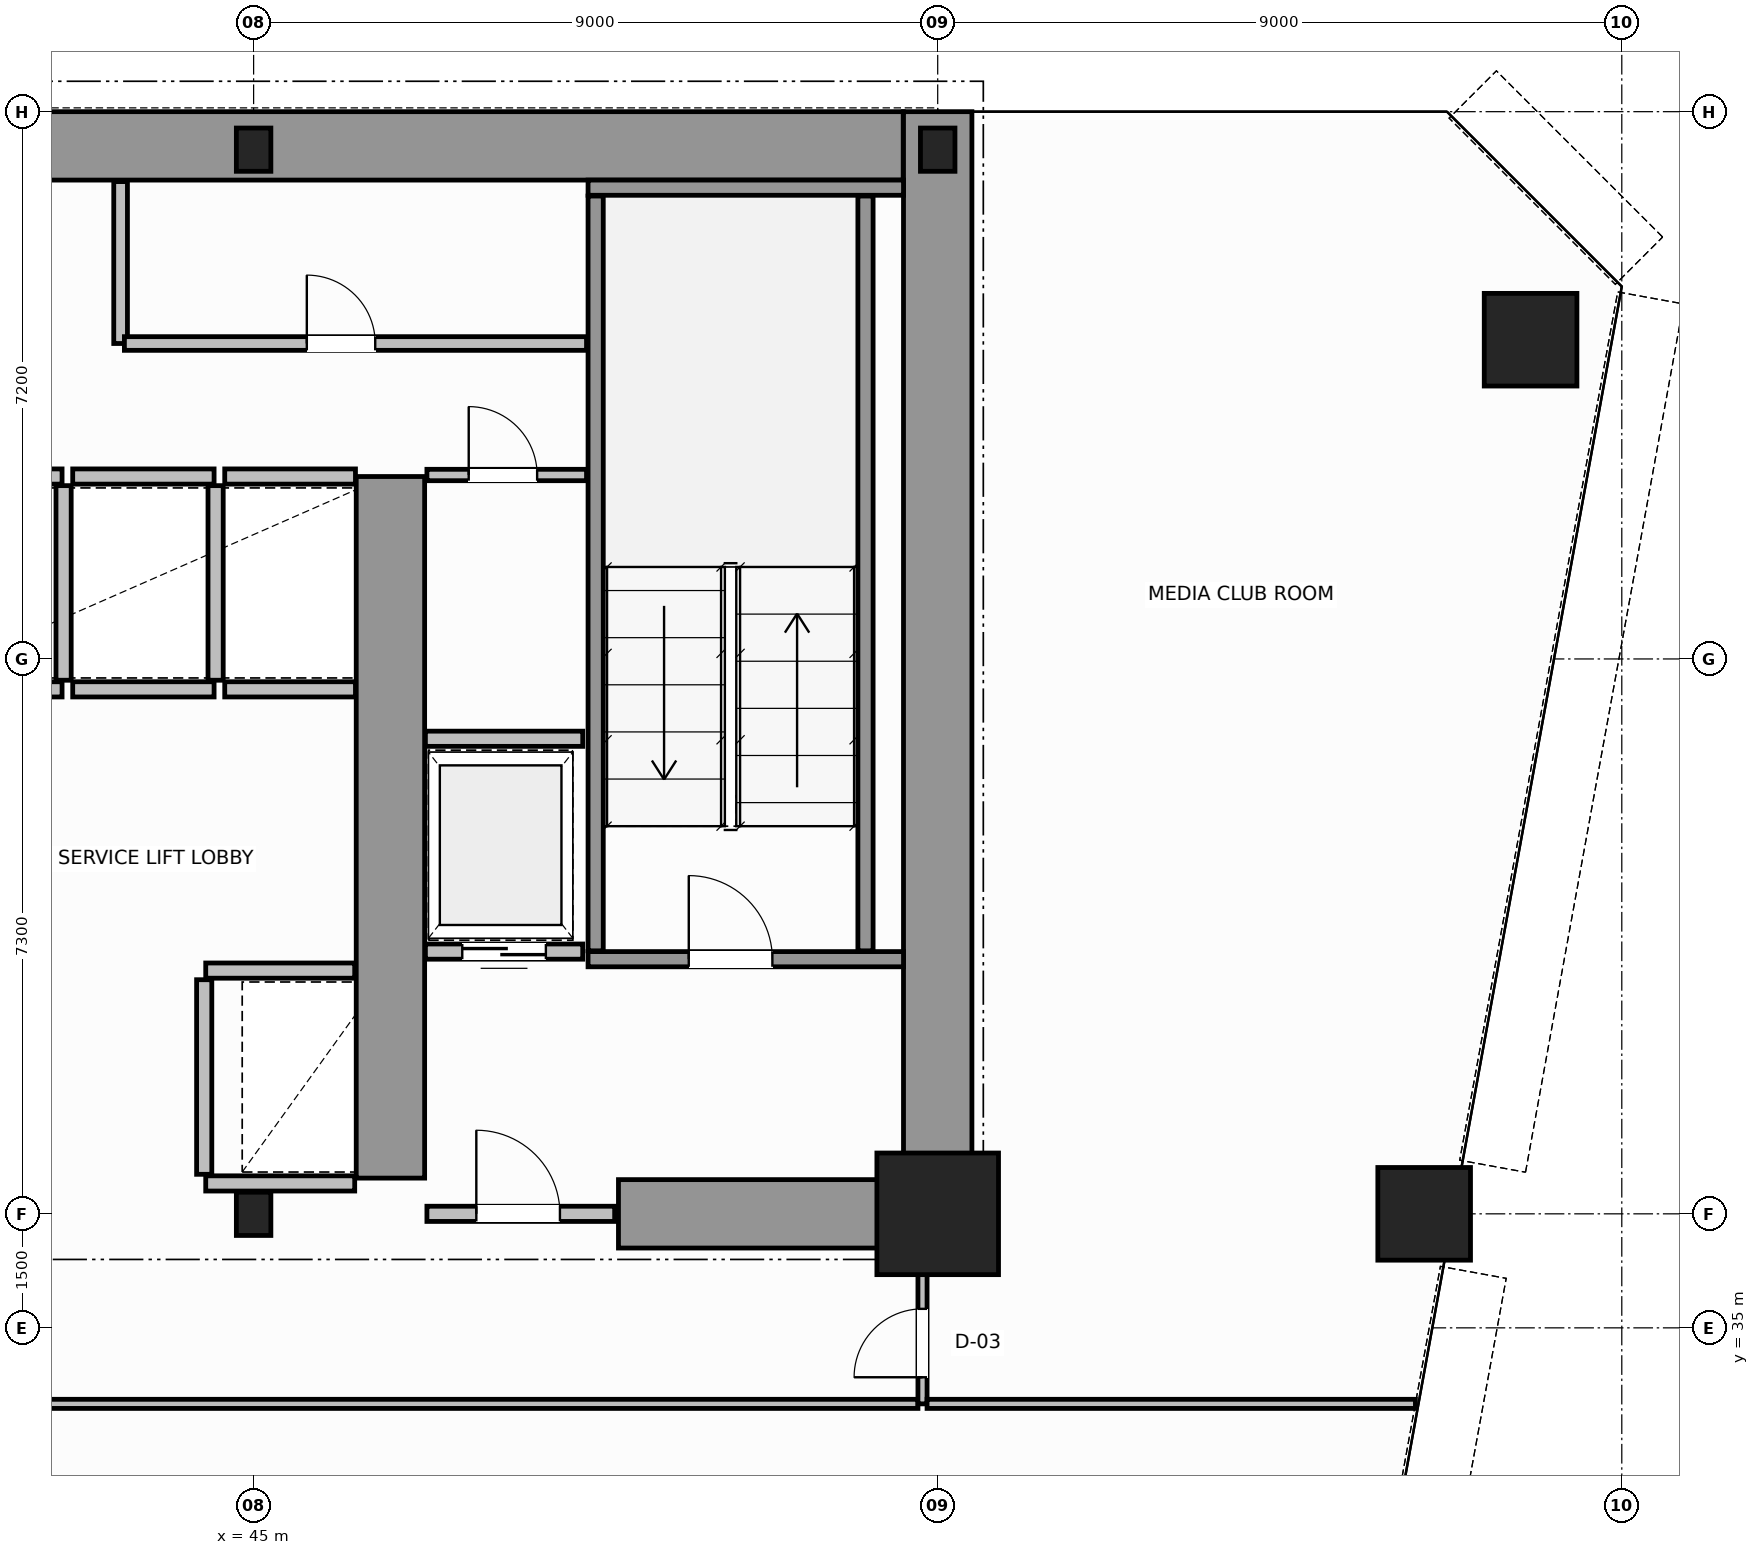
"""IFC4 building model, lengths in metres.
Left out: names, types, materials, properties, quantities, classifications, styles, units other than length and angle.
Written with IfcOpenShell. Run it as: python <this file> out.ifc"""

import sys

from ifc_helpers import new_model, si_unit, direction, frame, frame_2d, origin, origin_2d, place, context, subcontext, project, spatial, rectangle, hollow_circle, i_section, extrude, source, transform, mapped, element, fill, save


model = new_model("IFC4")
c1 = context("Model", 3, precision=1e-05, world=origin(), true_north=direction((0.0, 1.0)))
c2 = subcontext(c1, "Body", "Model", "MODEL_VIEW")
j1 = project(units=[si_unit("LENGTHUNIT", "METRE"), si_unit("PLANEANGLEUNIT", "RADIAN")], contexts=[c1])
p1 = place(None, origin())
s1 = spatial("IfcSite", under=j1, at=p1, CompositionType="ELEMENT")
p2 = place(p1, origin())
s2 = spatial("IfcBuilding", under=s1, at=p2, CompositionType="ELEMENT")
p3 = place(p2, frame((0.0, 0.0, 45.4)))
s3 = spatial("IfcBuildingStorey", under=s2, at=p3, CompositionType="ELEMENT", Elevation=45.4)
m1 = source(origin(), c2, "Body", "SweptSolid", [
    extrude(i_section(OverallWidth=0.454, OverallDepth=0.569, WebThickness=0.078, FlangeThickness=0.08, FilletRadius=0.015, at=origin_2d()), origin(), (0.0, 0.0, 1.0), 3.8),
])
p4 = place(p3, frame((45.0, 36.5, 0.0), z_axis=(0.0, 0.0, 1.0), x_axis=(1.0, 0.0, 0.0)))
e1 = element("IfcColumn", 1, at=p4, inside=s3, PredefinedType="COLUMN", context=c2, shape_type="MappedRepresentation", body=[
    mapped(m1, transform((0.0, 0.0, 0.0), scale=1.0)),
])
m2 = source(origin(), c2, "Body", "SweptSolid", [
    extrude(rectangle(XDim=1.6, YDim=1.6, at=origin_2d()), origin(), (0.0, 0.0, 1.0), 3.8),
])
p5 = place(p3, frame((54.0, 36.5, 0.0), z_axis=(0.0, 0.0, 1.0), x_axis=(1.0, 0.0, 0.0)))
e2 = element("IfcColumn", 2, at=p5, inside=s3, PredefinedType="COLUMN", context=c2, shape_type="MappedRepresentation", body=[
    mapped(m2, transform((0.0, 0.0, 0.0), scale=1.0)),
])
for number, where, z_axis, x_axis in (
    (3, (45.0, 50.5, 0.0), (0.0, 0.0, 1.0), (1.0, 0.0, 0.0)),
    (4, (54.0, 50.5, 0.0), (0.0, 0.0, 1.0), (1.0, 0.0, 0.0)),
):
    element("IfcColumn", number, at=place(p3, frame(where, z_axis=z_axis, x_axis=x_axis)), inside=s3, PredefinedType="COLUMN", context=c2, shape_type="MappedRepresentation", body=[
        mapped(m1, transform((0.0, 0.0, 0.0), scale=1.0)),
    ])
m3 = source(origin(), c2, "Body", "SweptSolid", [
    extrude(hollow_circle(Radius=0.61, WallThickness=0.05, at=origin_2d()), origin(), (0.0, 0.0, 1.0), 3.8),
])
for number, where, z_axis, x_axis in (
    (5, (61.8, 48.0, 0.0), (0.0, 0.0, 1.0), (1.0, 0.0, 0.0)),
    (6, (60.4, 36.5, 0.0), (0.0, 0.0, 1.0), (1.0, 0.0, 0.0)),
):
    element("IfcColumn", number, at=place(p3, frame(where, z_axis=z_axis, x_axis=x_axis)), inside=s3, PredefinedType="COLUMN", context=c2, shape_type="MappedRepresentation", body=[
        mapped(m3, transform((0.0, 0.0, 0.0), scale=1.0)),
    ])
p6 = place(p3, frame((34.002, 50.55, 0.0), z_axis=(0.0, 0.0, 1.0), x_axis=(1.0, 0.0, 0.0)))
e7 = element("IfcWall", 7, at=p6, inside=s3, PredefinedType="SHEAR", context=c2, shape_type="SweptSolid", body=[
    extrude(rectangle(XDim=19.544, YDim=0.9, at=frame_2d((9.772, 0.0))), origin(), (0.0, 0.0, 1.0), 3.8),
])
p7 = place(p3, frame((54.0, 36.5, 0.0), z_axis=(0.0, 0.0, 1.0), x_axis=(0.0, 1.0, 0.0)))
e8 = element("IfcWall", 8, at=p7, inside=s3, PredefinedType="SHEAR", context=c2, shape_type="SweptSolid", body=[
    extrude(rectangle(XDim=14.5, YDim=0.9, at=frame_2d((7.25, 0.0))), origin(), (0.0, 0.0, 1.0), 3.8),
])
p8 = place(p3, frame((49.8, 36.5, 0.0), z_axis=(0.0, 0.0, 1.0), x_axis=(1.0, 0.0, 0.0)))
e9 = element("IfcWall", 9, at=p8, inside=s3, PredefinedType="SHEAR", context=c2, shape_type="SweptSolid", body=[
    extrude(rectangle(XDim=3.73, YDim=0.9, at=frame_2d((1.865, 0.0))), origin(), (0.0, 0.0, 1.0), 2.38),
])
p9 = place(p3, frame((46.8, 36.97, 0.0), z_axis=(0.0, 0.0, 1.0), x_axis=(0.0, 1.0, 0.0)))
e10 = element("IfcWall", 10, at=p9, inside=s3, PredefinedType="SHEAR", context=c2, shape_type="SweptSolid", body=[
    extrude(rectangle(XDim=9.23, YDim=0.9, at=frame_2d((4.615, 0.0))), origin(), (0.0, 0.0, 1.0), 3.8),
])
p10 = place(p3, frame((49.4, 39.85, 0.0), z_axis=(0.0, 0.0, 1.0), x_axis=(1.0, 0.0, 0.0)))
e11 = element("IfcWall", 11, at=p10, inside=s3, PredefinedType="SOLIDWALL", context=c2, shape_type="SweptSolid", body=[
    extrude(rectangle(XDim=4.15, YDim=0.2, at=frame_2d((2.075, 0.0))), origin(), (0.0, 0.0, 1.0), 3.8),
])
p11 = place(p10, frame((1.325, 0.0, 0.0)))
e12 = element("IfcOpeningElement", 12, at=p11, cuts=e11, PredefinedType="OPENING", context=c2, shape_type="SweptSolid", body=[
    extrude(rectangle(XDim=1.1, YDim=2.15, at=frame_2d((0.55, 1.075))), frame((0.0, 0.11, 0.0), z_axis=(0.0, -1.0, 0.0), x_axis=(1.0, 0.0, 0.0)), (0.0, 0.0, 1.0), 0.22),
])
p12 = place(p3, frame((49.4, 50.0, 0.0), z_axis=(0.0, 0.0, 1.0), x_axis=(1.0, 0.0, 0.0)))
e13 = element("IfcWall", 13, at=p12, inside=s3, PredefinedType="SOLIDWALL", context=c2, shape_type="SweptSolid", body=[
    extrude(rectangle(XDim=4.15, YDim=0.2, at=frame_2d((2.075, 0.0))), origin(), (0.0, 0.0, 1.0), 3.8),
])
for number, where, z_axis, x_axis in (
    (14, (49.5, 39.96, 0.0), (0.0, 0.0, 1.0), (0.0, 1.0, 0.0)),
    (15, (53.05, 39.96, 0.0), (0.0, 0.0, 1.0), (0.0, 1.0, 0.0)),
):
    element("IfcWall", number, at=place(p3, frame(where, z_axis=z_axis, x_axis=x_axis)), inside=s3, PredefinedType="SOLIDWALL", context=c2, shape_type="SweptSolid", body=[
        extrude(rectangle(XDim=9.93, YDim=0.2, at=frame_2d((4.965, 0.0))), origin(), (0.0, 0.0, 1.0), 3.8),
    ])
p13 = place(p3, frame((47.28, 36.5, 0.0), z_axis=(0.0, 0.0, 1.0), x_axis=(1.0, 0.0, 0.0)))
e16 = element("IfcWall", 16, at=p13, inside=s3, PredefinedType="SOLIDWALL", context=c2, shape_type="SweptSolid", body=[
    extrude(rectangle(XDim=2.47, YDim=0.2, at=frame_2d((1.235, 0.0))), origin(), (0.0, 0.0, 1.0), 2.37),
])
p14 = place(p13, frame((0.65, 0.0, 0.0)))
e17 = element("IfcOpeningElement", 17, at=p14, cuts=e16, PredefinedType="OPENING", context=c2, shape_type="SweptSolid", body=[
    extrude(rectangle(XDim=1.1, YDim=2.15, at=frame_2d((0.55, 1.075))), frame((0.0, 0.11, 0.0), z_axis=(0.0, -1.0, 0.0), x_axis=(1.0, 0.0, 0.0)), (0.0, 0.0, 1.0), 0.22),
])
p15 = place(p3, frame((44.37, 39.7, 0.0), z_axis=(0.0, 0.0, 1.0), x_axis=(1.0, 0.0, 0.0)))
e18 = element("IfcWall", 18, at=p15, inside=s3, PredefinedType="SOLIDWALL", context=c2, shape_type="SweptSolid", body=[
    extrude(rectangle(XDim=1.96, YDim=0.2, at=frame_2d((0.98, 0.0))), origin(), (0.0, 0.0, 1.0), 3.58),
])
p16 = place(p3, frame((44.37, 36.9, 0.0), z_axis=(0.0, 0.0, 1.0), x_axis=(1.0, 0.0, 0.0)))
e19 = element("IfcWall", 19, at=p16, inside=s3, PredefinedType="SOLIDWALL", context=c2, shape_type="SweptSolid", body=[
    extrude(rectangle(XDim=1.96, YDim=0.2, at=frame_2d((0.98, 0.0))), origin(), (0.0, 0.0, 1.0), 2.37),
])
p17 = place(p3, frame((44.35, 37.02, 0.0), z_axis=(0.0, 0.0, 1.0), x_axis=(0.0, 1.0, 0.0)))
e20 = element("IfcWall", 20, at=p17, inside=s3, PredefinedType="SOLIDWALL", context=c2, shape_type="SweptSolid", body=[
    extrude(rectangle(XDim=2.56, YDim=0.2, at=frame_2d((1.28, 0.0))), origin(), (0.0, 0.0, 1.0), 3.58),
])
for number, where, z_axis, x_axis in (
    (21, (40.62, 43.4, 0.0), (0.0, 0.0, 1.0), (1.0, 0.0, 0.0)),
    (22, (40.62, 46.2, 0.0), (0.0, 0.0, 1.0), (1.0, 0.0, 0.0)),
):
    element("IfcWall", number, at=place(p3, frame(where, z_axis=z_axis, x_axis=x_axis)), inside=s3, PredefinedType="SOLIDWALL", context=c2, shape_type="SweptSolid", body=[
        extrude(rectangle(XDim=1.86, YDim=0.2, at=frame_2d((0.93, 0.0))), origin(), (0.0, 0.0, 1.0), 3.58),
    ])
p18 = place(p3, frame((42.5, 43.52, 0.0), z_axis=(0.0, 0.0, 1.0), x_axis=(0.0, 1.0, 0.0)))
e23 = element("IfcWall", 23, at=p18, inside=s3, PredefinedType="SOLIDWALL", context=c2, shape_type="SweptSolid", body=[
    extrude(rectangle(XDim=2.56, YDim=0.2, at=frame_2d((1.28, 0.0))), origin(), (0.0, 0.0, 1.0), 3.58),
])
for number, where, z_axis, x_axis in (
    (24, (42.62, 43.4, 0.0), (0.0, 0.0, 1.0), (1.0, 0.0, 0.0)),
    (25, (42.62, 46.2, 0.0), (0.0, 0.0, 1.0), (1.0, 0.0, 0.0)),
):
    element("IfcWall", number, at=place(p3, frame(where, z_axis=z_axis, x_axis=x_axis)), inside=s3, PredefinedType="SOLIDWALL", context=c2, shape_type="SweptSolid", body=[
        extrude(rectangle(XDim=1.86, YDim=0.2, at=frame_2d((0.93, 0.0))), origin(), (0.0, 0.0, 1.0), 3.58),
    ])
p19 = place(p3, frame((44.5, 43.52, 0.0), z_axis=(0.0, 0.0, 1.0), x_axis=(0.0, 1.0, 0.0)))
e26 = element("IfcWall", 26, at=p19, inside=s3, PredefinedType="SOLIDWALL", context=c2, shape_type="SweptSolid", body=[
    extrude(rectangle(XDim=2.56, YDim=0.2, at=frame_2d((1.28, 0.0))), origin(), (0.0, 0.0, 1.0), 3.58),
])
for number, where, z_axis, x_axis in (
    (27, (44.62, 43.4, 0.0), (0.0, 0.0, 1.0), (1.0, 0.0, 0.0)),
    (28, (44.62, 46.2, 0.0), (0.0, 0.0, 1.0), (1.0, 0.0, 0.0)),
):
    element("IfcWall", number, at=place(p3, frame(where, z_axis=z_axis, x_axis=x_axis)), inside=s3, PredefinedType="SOLIDWALL", context=c2, shape_type="SweptSolid", body=[
        extrude(rectangle(XDim=1.72, YDim=0.2, at=frame_2d((0.86, 0.0))), origin(), (0.0, 0.0, 1.0), 3.58),
    ])
p20 = place(p3, frame((47.26, 39.95, 0.0), z_axis=(0.0, 0.0, 1.0), x_axis=(1.0, 0.0, 0.0)))
e29 = element("IfcWall", 29, at=p20, inside=s3, PredefinedType="SOLIDWALL", context=c2, shape_type="SweptSolid", body=[
    extrude(rectangle(XDim=2.07, YDim=0.2, at=frame_2d((1.035, 0.0))), origin(), (0.0, 0.0, 1.0), 3.58),
])
p21 = place(p20, frame((0.485, 0.0, 0.0)))
e30 = element("IfcOpeningElement", 30, at=p21, cuts=e29, PredefinedType="OPENING", context=c2, shape_type="SweptSolid", body=[
    extrude(rectangle(XDim=1.1, YDim=2.15, at=frame_2d((0.55, 1.075))), frame((0.0, 0.11, 0.0), z_axis=(0.0, -1.0, 0.0), x_axis=(1.0, 0.0, 0.0)), (0.0, 0.0, 1.0), 0.22),
])
p22 = place(p3, frame((47.26, 42.75, 0.0), z_axis=(0.0, 0.0, 1.0), x_axis=(1.0, 0.0, 0.0)))
e31 = element("IfcWall", 31, at=p22, inside=s3, PredefinedType="SOLIDWALL", context=c2, shape_type="SweptSolid", body=[
    extrude(rectangle(XDim=2.07, YDim=0.2, at=frame_2d((1.035, 0.0))), origin(), (0.0, 0.0, 1.0), 3.58),
])
p23 = place(p3, frame((47.28, 46.22, 0.0), z_axis=(0.0, 0.0, 1.0), x_axis=(1.0, 0.0, 0.0)))
e32 = element("IfcWall", 32, at=p23, inside=s3, PredefinedType="PARTITIONING", context=c2, shape_type="SweptSolid", body=[
    extrude(rectangle(XDim=2.1, YDim=0.15, at=frame_2d((1.05, 0.0))), origin(), (0.0, 0.0, 1.0), 3.58),
])
p24 = place(p23, frame((0.55, 0.0, 0.0)))
e33 = element("IfcOpeningElement", 33, at=p24, cuts=e32, PredefinedType="OPENING", context=c2, shape_type="SweptSolid", body=[
    extrude(rectangle(XDim=0.9, YDim=2.1, at=frame_2d((0.45, 1.05))), frame((0.0, 0.085, 0.0), z_axis=(0.0, -1.0, 0.0), x_axis=(1.0, 0.0, 0.0)), (0.0, 0.0, 1.0), 0.17),
])
p25 = place(p3, frame((43.25, 47.95, 0.0), z_axis=(0.0, 0.0, 1.0), x_axis=(0.0, 1.0, 0.0)))
e34 = element("IfcWall", 34, at=p25, inside=s3, PredefinedType="PLUMBINGWALL", context=c2, shape_type="SweptSolid", body=[
    extrude(rectangle(XDim=2.13, YDim=0.18, at=frame_2d((1.065, 0.0))), origin(), (0.0, 0.0, 1.0), 3.58),
])
p26 = place(p3, frame((43.3, 47.95, 0.0), z_axis=(0.0, 0.0, 1.0), x_axis=(1.0, 0.0, 0.0)))
e35 = element("IfcWall", 35, at=p26, inside=s3, PredefinedType="PLUMBINGWALL", context=c2, shape_type="SweptSolid", body=[
    extrude(rectangle(XDim=6.08, YDim=0.18, at=frame_2d((3.04, 0.0))), origin(), (0.0, 0.0, 1.0), 3.58),
])
p27 = place(p26, frame((2.4, 0.0, 0.0)))
e36 = element("IfcOpeningElement", 36, at=p27, cuts=e35, PredefinedType="OPENING", context=c2, shape_type="SweptSolid", body=[
    extrude(rectangle(XDim=0.9, YDim=2.15, at=frame_2d((0.45, 1.075))), frame((0.0, 0.1, 0.0), z_axis=(0.0, -1.0, 0.0), x_axis=(1.0, 0.0, 0.0)), (0.0, 0.0, 1.0), 0.2),
])
p28 = place(p3, frame((29.66, 34.0, 0.0), z_axis=(0.0, 0.0, 1.0), x_axis=(1.0, 0.0, 0.0)))
e37 = element("IfcWall", 37, at=p28, inside=s3, PredefinedType="PARTITIONING", context=c2, shape_type="SweptSolid", body=[
    extrude(rectangle(XDim=24.08, YDim=0.12, at=frame_2d((12.04, 0.0))), origin(), (0.0, 0.0, 1.0), 3.02),
])
p29 = place(p3, frame((53.8, 34.0, 0.0), z_axis=(0.0, 0.0, 1.0), x_axis=(0.0, 1.0, 0.0)))
e38 = element("IfcWall", 38, at=p29, inside=s3, PredefinedType="PARTITIONING", context=c2, shape_type="SweptSolid", body=[
    extrude(rectangle(XDim=2.44, YDim=0.12, at=frame_2d((1.22, 0.0))), origin(), (0.0, 0.0, 1.0), 3.58),
])
p30 = place(p29, frame((0.35, 0.0, 0.0)))
e39 = element("IfcOpeningElement", 39, at=p30, cuts=e38, PredefinedType="OPENING", context=c2, shape_type="SweptSolid", body=[
    extrude(rectangle(XDim=0.9, YDim=2.15, at=frame_2d((0.45, 1.075))), frame((0.0, 0.07, 0.0), z_axis=(0.0, -1.0, 0.0), x_axis=(1.0, 0.0, 0.0)), (0.0, 0.0, 1.0), 0.14),
])
p31 = place(p3, frame((53.86, 34.0, 0.0), z_axis=(0.0, 0.0, 1.0), x_axis=(1.0, 0.0, 0.0)))
e40 = element("IfcWall", 40, at=p31, inside=s3, PredefinedType="PARTITIONING", context=c2, shape_type="SweptSolid", body=[
    extrude(rectangle(XDim=6.425, YDim=0.12, at=frame_2d((3.212, 0.0))), origin(), (0.0, 0.0, 1.0), 3.02),
])
m4 = source(origin(), c2, "Body", "SweptSolid", [
    extrude(rectangle(XDim=1.1, YDim=2.15, at=frame_2d((0.55, 1.075))), frame((0.0, 0.025, 0.0), z_axis=(0.0, -1.0, 0.0), x_axis=(1.0, 0.0, 0.0)), (0.0, 0.0, 1.0), 0.05),
])
p32 = place(p11, origin())
e41 = element("IfcDoor", 41, at=p32, inside=s3, OperationType="SINGLE_SWING_RIGHT", PredefinedType="DOOR", context=c2, shape_type="MappedRepresentation", body=[
    mapped(m4, transform((0.0, 0.0, 0.0), scale=1.0)),
])
fill(e12, e41)
p33 = place(p14, origin())
e42 = element("IfcDoor", 42, at=p33, inside=s3, OperationType="SINGLE_SWING_LEFT", PredefinedType="DOOR", context=c2, shape_type="MappedRepresentation", body=[
    mapped(m4, transform((0.0, 0.0, 0.0), scale=1.0)),
])
fill(e17, e42)
p34 = place(p21, origin())
e43 = element("IfcDoor", 43, at=p34, inside=s3, OperationType="DOUBLE_DOOR_SLIDING", PredefinedType="DOOR", context=c2, shape_type="MappedRepresentation", body=[
    mapped(m4, transform((0.0, 0.0, 0.0), scale=1.0)),
])
fill(e30, e43)
m5 = source(origin(), c2, "Body", "SweptSolid", [
    extrude(rectangle(XDim=0.9, YDim=2.1, at=frame_2d((0.45, 1.05))), frame((0.0, 0.025, 0.0), z_axis=(0.0, -1.0, 0.0), x_axis=(1.0, 0.0, 0.0)), (0.0, 0.0, 1.0), 0.05),
])
p35 = place(p24, origin())
e44 = element("IfcDoor", 44, at=p35, inside=s3, OperationType="SINGLE_SWING_RIGHT", PredefinedType="DOOR", context=c2, shape_type="MappedRepresentation", body=[
    mapped(m5, transform((0.0, 0.0, 0.0), scale=1.0)),
])
fill(e33, e44)
m6 = source(origin(), c2, "Body", "SweptSolid", [
    extrude(rectangle(XDim=0.9, YDim=2.15, at=frame_2d((0.45, 1.075))), frame((0.0, 0.025, 0.0), z_axis=(0.0, -1.0, 0.0), x_axis=(1.0, 0.0, 0.0)), (0.0, 0.0, 1.0), 0.05),
])
p36 = place(p27, origin())
e45 = element("IfcDoor", 45, at=p36, inside=s3, OperationType="SINGLE_SWING_RIGHT", PredefinedType="DOOR", context=c2, shape_type="MappedRepresentation", body=[
    mapped(m6, transform((0.0, 0.0, 0.0), scale=1.0)),
])
fill(e36, e45)
p37 = place(p30, origin())
e46 = element("IfcDoor", 46, at=p37, inside=s3, OperationType="SINGLE_SWING_RIGHT", PredefinedType="DOOR", context=c2, shape_type="MappedRepresentation", body=[
    mapped(m6, transform((0.0, 0.0, 0.0), scale=1.0)),
])
fill(e39, e46)
save(model, sys.argv[1])
